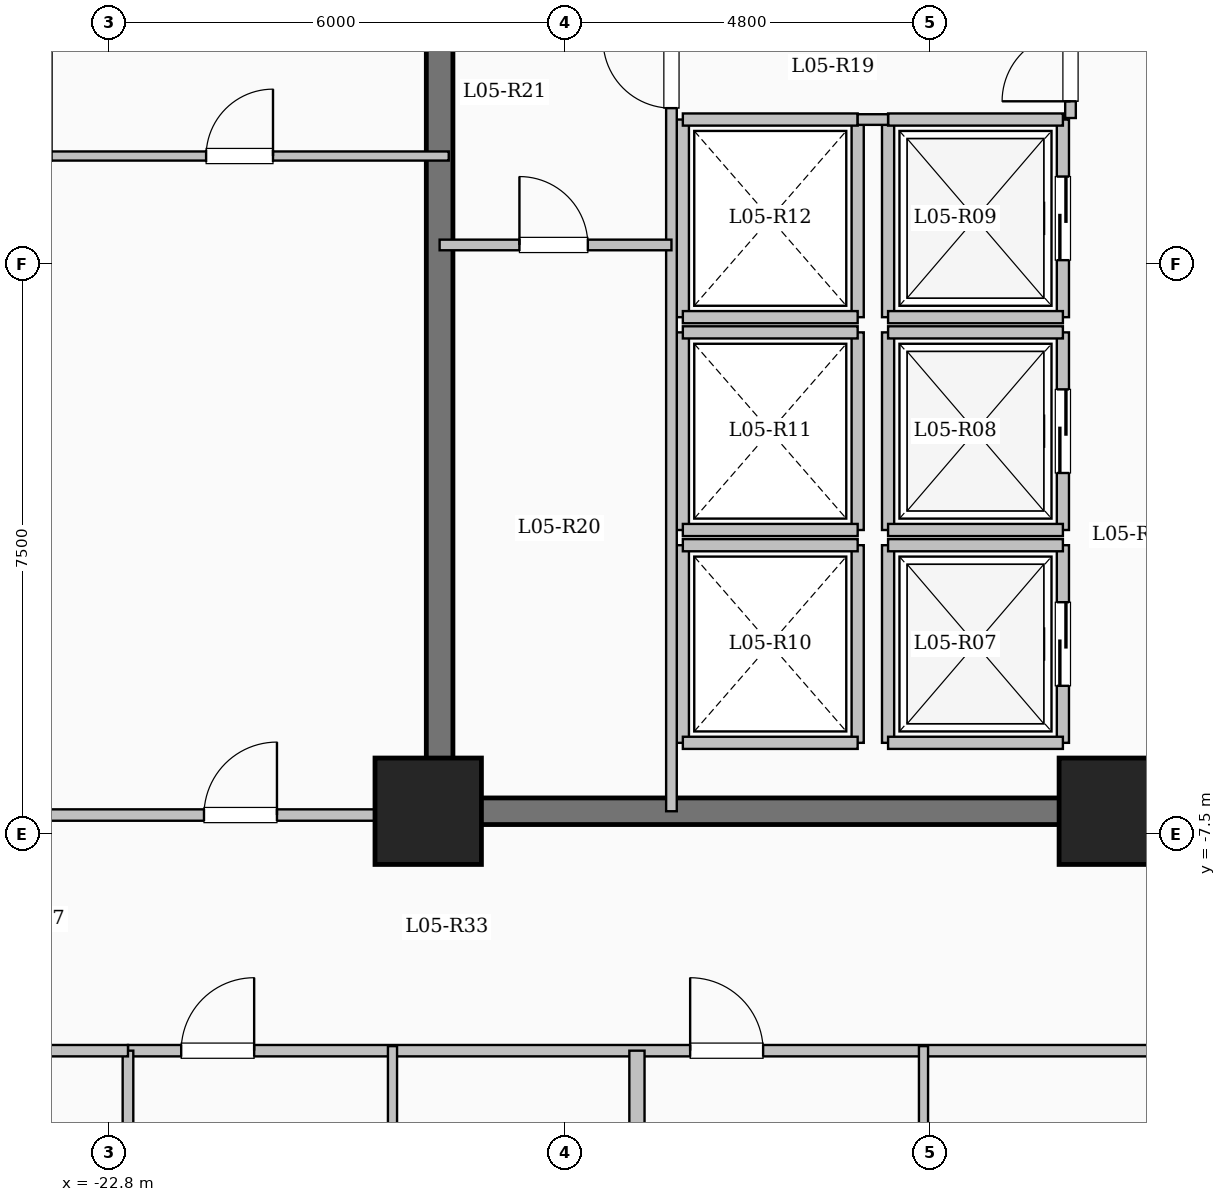
"""IFC4 building model, lengths in metres.
Left out: names, types, materials, properties, quantities, classifications, styles, units other than length and angle.
Written with IfcOpenShell. Run it as: python <this file> out.ifc"""

import sys

from ifc_helpers import new_model, si_unit, direction, frame, frame_2d, origin, origin_2d, place, context, subcontext, project, spatial, rectangle, extrude, element, fill, save


model = new_model("IFC4")
c1 = context("Model", 3, precision=1e-05, world=origin(), true_north=direction((0.0, 1.0)))
c2 = subcontext(c1, "Body", "Model", "MODEL_VIEW")
j1 = project(units=[si_unit("LENGTHUNIT", "METRE"), si_unit("PLANEANGLEUNIT", "RADIAN")], contexts=[c1])
p1 = place(None, origin())
s1 = spatial("IfcSite", under=j1, at=p1, CompositionType="ELEMENT")
p2 = place(p1, origin())
s2 = spatial("IfcBuilding", under=s1, at=p2, CompositionType="ELEMENT")
p3 = place(p2, frame((0.0, 0.0, 24.0)))
s3 = spatial("IfcBuildingStorey", under=s2, at=p3, CompositionType="ELEMENT", Elevation=24.0)
for number, where, z_axis, x_axis in (
    (1, (-9.6, -7.2, 0.0), (0.0, 0.0, 1.0), (1.0, 0.0, 0.0)),
    (2, (-18.6, -7.2, 0.0), (0.0, 0.0, 1.0), (1.0, 0.0, 0.0)),
):
    element("IfcColumn", number, at=place(p3, frame(where, z_axis=z_axis, x_axis=x_axis)), inside=s3, PredefinedType="COLUMN", context=c2, shape_type="SweptSolid", body=[
        extrude(rectangle(XDim=1.4, YDim=1.4, at=origin_2d()), origin(), (0.0, 0.0, 1.0), 3.35),
    ])
p4 = place(p3, frame((-12.55, -6.3, 0.0), z_axis=(0.0, 0.0, 1.0), x_axis=(0.0, 1.0, 0.0)))
e3 = element("IfcWall", 3, at=p4, inside=s3, PredefinedType="SOLIDWALL", context=c2, shape_type="SweptSolid", body=[
    extrude(rectangle(XDim=2.6, YDim=0.16, at=frame_2d((1.3, 0.0))), origin(), (0.0, 0.0, 1.0), 3.1),
])
p5 = place(p3, frame((-10.25, -6.3, 0.0), z_axis=(0.0, 0.0, 1.0), x_axis=(0.0, 1.0, 0.0)))
e4 = element("IfcWall", 4, at=p5, inside=s3, PredefinedType="SOLIDWALL", context=c2, shape_type="SweptSolid", body=[
    extrude(rectangle(XDim=2.6, YDim=0.16, at=frame_2d((1.3, 0.0))), origin(), (0.0, 0.0, 1.0), 3.1),
])
p6 = place(p5, frame((0.75, 0.0, 0.0)))
e5 = element("IfcOpeningElement", 5, at=p6, cuts=e4, PredefinedType="OPENING", context=c2, shape_type="SweptSolid", body=[
    extrude(rectangle(XDim=1.1, YDim=2.15, at=frame_2d((0.55, 1.075))), frame((0.0, 0.09, 0.0), z_axis=(0.0, -1.0, 0.0), x_axis=(1.0, 0.0, 0.0)), (0.0, 0.0, 1.0), 0.18),
])
for number, where, z_axis, x_axis in (
    (6, (-12.55, -6.3, 0.0), (0.0, 0.0, 1.0), (1.0, 0.0, 0.0)),
    (7, (-12.55, -3.7, 0.0), (0.0, 0.0, 1.0), (1.0, 0.0, 0.0)),
):
    element("IfcWall", number, at=place(p3, frame(where, z_axis=z_axis, x_axis=x_axis)), inside=s3, PredefinedType="SOLIDWALL", context=c2, shape_type="SweptSolid", body=[
        extrude(rectangle(XDim=2.3, YDim=0.16, at=frame_2d((1.15, 0.0))), origin(), (0.0, 0.0, 1.0), 3.1),
    ])
p7 = place(p3, frame((-12.55, -3.5, 0.0), z_axis=(0.0, 0.0, 1.0), x_axis=(0.0, 1.0, 0.0)))
e8 = element("IfcWall", 8, at=p7, inside=s3, PredefinedType="SOLIDWALL", context=c2, shape_type="SweptSolid", body=[
    extrude(rectangle(XDim=2.6, YDim=0.16, at=frame_2d((1.3, 0.0))), origin(), (0.0, 0.0, 1.0), 3.1),
])
p8 = place(p3, frame((-10.25, -3.5, 0.0), z_axis=(0.0, 0.0, 1.0), x_axis=(0.0, 1.0, 0.0)))
e9 = element("IfcWall", 9, at=p8, inside=s3, PredefinedType="SOLIDWALL", context=c2, shape_type="SweptSolid", body=[
    extrude(rectangle(XDim=2.6, YDim=0.16, at=frame_2d((1.3, 0.0))), origin(), (0.0, 0.0, 1.0), 3.1),
])
p9 = place(p8, frame((0.75, 0.0, 0.0)))
e10 = element("IfcOpeningElement", 10, at=p9, cuts=e9, PredefinedType="OPENING", context=c2, shape_type="SweptSolid", body=[
    extrude(rectangle(XDim=1.1, YDim=2.15, at=frame_2d((0.55, 1.075))), frame((0.0, 0.09, 0.0), z_axis=(0.0, -1.0, 0.0), x_axis=(1.0, 0.0, 0.0)), (0.0, 0.0, 1.0), 0.18),
])
for number, where, z_axis, x_axis in (
    (11, (-12.55, -3.5, 0.0), (0.0, 0.0, 1.0), (1.0, 0.0, 0.0)),
    (12, (-12.55, -0.9, 0.0), (0.0, 0.0, 1.0), (1.0, 0.0, 0.0)),
):
    element("IfcWall", number, at=place(p3, frame(where, z_axis=z_axis, x_axis=x_axis)), inside=s3, PredefinedType="SOLIDWALL", context=c2, shape_type="SweptSolid", body=[
        extrude(rectangle(XDim=2.3, YDim=0.16, at=frame_2d((1.15, 0.0))), origin(), (0.0, 0.0, 1.0), 3.1),
    ])
p10 = place(p3, frame((-12.55, -0.7, 0.0), z_axis=(0.0, 0.0, 1.0), x_axis=(0.0, 1.0, 0.0)))
e13 = element("IfcWall", 13, at=p10, inside=s3, PredefinedType="SOLIDWALL", context=c2, shape_type="SweptSolid", body=[
    extrude(rectangle(XDim=2.6, YDim=0.16, at=frame_2d((1.3, 0.0))), origin(), (0.0, 0.0, 1.0), 3.1),
])
p11 = place(p3, frame((-10.25, -0.7, 0.0), z_axis=(0.0, 0.0, 1.0), x_axis=(0.0, 1.0, 0.0)))
e14 = element("IfcWall", 14, at=p11, inside=s3, PredefinedType="SOLIDWALL", context=c2, shape_type="SweptSolid", body=[
    extrude(rectangle(XDim=2.6, YDim=0.16, at=frame_2d((1.3, 0.0))), origin(), (0.0, 0.0, 1.0), 3.1),
])
p12 = place(p11, frame((0.75, 0.0, 0.0)))
e15 = element("IfcOpeningElement", 15, at=p12, cuts=e14, PredefinedType="OPENING", context=c2, shape_type="SweptSolid", body=[
    extrude(rectangle(XDim=1.1, YDim=2.15, at=frame_2d((0.55, 1.075))), frame((0.0, 0.09, 0.0), z_axis=(0.0, -1.0, 0.0), x_axis=(1.0, 0.0, 0.0)), (0.0, 0.0, 1.0), 0.18),
])
for number, where, z_axis, x_axis in (
    (16, (-12.55, -0.7, 0.0), (0.0, 0.0, 1.0), (1.0, 0.0, 0.0)),
    (17, (-12.55, 1.9, 0.0), (0.0, 0.0, 1.0), (1.0, 0.0, 0.0)),
):
    element("IfcWall", number, at=place(p3, frame(where, z_axis=z_axis, x_axis=x_axis)), inside=s3, PredefinedType="SOLIDWALL", context=c2, shape_type="SweptSolid", body=[
        extrude(rectangle(XDim=2.3, YDim=0.16, at=frame_2d((1.15, 0.0))), origin(), (0.0, 0.0, 1.0), 3.1),
    ])
for number, where, z_axis, x_axis in (
    (18, (-15.25, -6.3, 0.0), (0.0, 0.0, 1.0), (0.0, 1.0, 0.0)),
    (19, (-12.95, -6.3, 0.0), (0.0, 0.0, 1.0), (0.0, 1.0, 0.0)),
):
    element("IfcWall", number, at=place(p3, frame(where, z_axis=z_axis, x_axis=x_axis)), inside=s3, PredefinedType="SOLIDWALL", context=c2, shape_type="SweptSolid", body=[
        extrude(rectangle(XDim=2.6, YDim=0.16, at=frame_2d((1.3, 0.0))), origin(), (0.0, 0.0, 1.0), 3.1),
    ])
for number, where, z_axis, x_axis in (
    (20, (-15.25, -6.3, 0.0), (0.0, 0.0, 1.0), (1.0, 0.0, 0.0)),
    (21, (-15.25, -3.7, 0.0), (0.0, 0.0, 1.0), (1.0, 0.0, 0.0)),
):
    element("IfcWall", number, at=place(p3, frame(where, z_axis=z_axis, x_axis=x_axis)), inside=s3, PredefinedType="SOLIDWALL", context=c2, shape_type="SweptSolid", body=[
        extrude(rectangle(XDim=2.3, YDim=0.16, at=frame_2d((1.15, 0.0))), origin(), (0.0, 0.0, 1.0), 3.1),
    ])
for number, where, z_axis, x_axis in (
    (22, (-15.25, -3.5, 0.0), (0.0, 0.0, 1.0), (0.0, 1.0, 0.0)),
    (23, (-12.95, -3.5, 0.0), (0.0, 0.0, 1.0), (0.0, 1.0, 0.0)),
):
    element("IfcWall", number, at=place(p3, frame(where, z_axis=z_axis, x_axis=x_axis)), inside=s3, PredefinedType="SOLIDWALL", context=c2, shape_type="SweptSolid", body=[
        extrude(rectangle(XDim=2.6, YDim=0.16, at=frame_2d((1.3, 0.0))), origin(), (0.0, 0.0, 1.0), 3.1),
    ])
for number, where, z_axis, x_axis in (
    (24, (-15.25, -3.5, 0.0), (0.0, 0.0, 1.0), (1.0, 0.0, 0.0)),
    (25, (-15.25, -0.9, 0.0), (0.0, 0.0, 1.0), (1.0, 0.0, 0.0)),
):
    element("IfcWall", number, at=place(p3, frame(where, z_axis=z_axis, x_axis=x_axis)), inside=s3, PredefinedType="SOLIDWALL", context=c2, shape_type="SweptSolid", body=[
        extrude(rectangle(XDim=2.3, YDim=0.16, at=frame_2d((1.15, 0.0))), origin(), (0.0, 0.0, 1.0), 3.1),
    ])
for number, where, z_axis, x_axis in (
    (26, (-15.25, -0.7, 0.0), (0.0, 0.0, 1.0), (0.0, 1.0, 0.0)),
    (27, (-12.95, -0.7, 0.0), (0.0, 0.0, 1.0), (0.0, 1.0, 0.0)),
):
    element("IfcWall", number, at=place(p3, frame(where, z_axis=z_axis, x_axis=x_axis)), inside=s3, PredefinedType="SOLIDWALL", context=c2, shape_type="SweptSolid", body=[
        extrude(rectangle(XDim=2.6, YDim=0.16, at=frame_2d((1.3, 0.0))), origin(), (0.0, 0.0, 1.0), 3.1),
    ])
for number, where, z_axis, x_axis in (
    (28, (-15.25, -0.7, 0.0), (0.0, 0.0, 1.0), (1.0, 0.0, 0.0)),
    (29, (-15.25, 1.9, 0.0), (0.0, 0.0, 1.0), (1.0, 0.0, 0.0)),
):
    element("IfcWall", number, at=place(p3, frame(where, z_axis=z_axis, x_axis=x_axis)), inside=s3, PredefinedType="SOLIDWALL", context=c2, shape_type="SweptSolid", body=[
        extrude(rectangle(XDim=2.3, YDim=0.16, at=frame_2d((1.15, 0.0))), origin(), (0.0, 0.0, 1.0), 3.1),
    ])
p13 = place(p3, frame((-18.45, -7.375, 0.0), z_axis=(0.0, 0.0, 1.0), x_axis=(0.0, 1.0, 0.0)))
e30 = element("IfcWall", 30, at=p13, inside=s3, PredefinedType="SHEAR", context=c2, shape_type="SweptSolid", body=[
    extrude(rectangle(XDim=14.05, YDim=0.35, at=frame_2d((7.025, 0.0))), origin(), (0.0, 0.0, 1.0), 3.35),
])
p14 = place(p3, frame((-18.625, -7.2, 0.0), z_axis=(0.0, 0.0, 1.0), x_axis=(1.0, 0.0, 0.0)))
e31 = element("IfcWall", 31, at=p14, inside=s3, PredefinedType="SHEAR", context=c2, shape_type="SweptSolid", body=[
    extrude(rectangle(XDim=8.55, YDim=0.35, at=frame_2d((4.275, 0.0))), origin(), (0.0, 0.0, 1.0), 3.35),
])
p15 = place(p3, frame((-12.95, 1.9, 0.0), z_axis=(0.0, 0.0, 1.0), x_axis=(1.0, 0.0, 0.0)))
e32 = element("IfcWall", 32, at=p15, inside=s3, PredefinedType="PARTITIONING", context=c2, shape_type="SweptSolid", body=[
    extrude(rectangle(XDim=0.4, YDim=0.14, at=frame_2d((0.2, 0.0))), origin(), (0.0, 0.0, 1.0), 3.1),
])
p16 = place(p3, frame((-10.15, 1.92, 0.0), z_axis=(0.0, 0.0, 1.0), x_axis=(0.0, 1.0, 0.0)))
e33 = element("IfcWall", 33, at=p16, inside=s3, PredefinedType="PARTITIONING", context=c2, shape_type="SweptSolid", body=[
    extrude(rectangle(XDim=1.33, YDim=0.14, at=frame_2d((0.665, 0.0))), origin(), (0.0, 0.0, 1.0), 3.1),
])
p17 = place(p16, frame((0.22, 0.0, 0.0)))
e34 = element("IfcOpeningElement", 34, at=p17, cuts=e33, PredefinedType="OPENING", context=c2, shape_type="SweptSolid", body=[
    extrude(rectangle(XDim=0.9, YDim=2.08, at=frame_2d((0.45, 1.04))), frame((0.0, 0.08, 0.0), z_axis=(0.0, -1.0, 0.0), x_axis=(1.0, 0.0, 0.0)), (0.0, 0.0, 1.0), 0.16),
])
p18 = place(p3, frame((-15.4, -7.2, 0.0), z_axis=(0.0, 0.0, 1.0), x_axis=(0.0, 1.0, 0.0)))
e35 = element("IfcWall", 35, at=p18, inside=s3, PredefinedType="PARTITIONING", context=c2, shape_type="SweptSolid", body=[
    extrude(rectangle(XDim=10.45, YDim=0.14, at=frame_2d((5.225, 0.0))), origin(), (0.0, 0.0, 1.0), 3.1),
])
p19 = place(p18, frame((9.25, 0.0, 0.0)))
e36 = element("IfcOpeningElement", 36, at=p19, cuts=e35, PredefinedType="OPENING", context=c2, shape_type="SweptSolid", body=[
    extrude(rectangle(XDim=0.9, YDim=2.08, at=frame_2d((0.45, 1.04))), frame((0.0, 0.08, 0.0), z_axis=(0.0, -1.0, 0.0), x_axis=(1.0, 0.0, 0.0)), (0.0, 0.0, 1.0), 0.16),
])
p20 = place(p3, frame((-18.45, 0.25, 0.0), z_axis=(0.0, 0.0, 1.0), x_axis=(1.0, 0.0, 0.0)))
e37 = element("IfcWall", 37, at=p20, inside=s3, PredefinedType="PARTITIONING", context=c2, shape_type="SweptSolid", body=[
    extrude(rectangle(XDim=3.05, YDim=0.14, at=frame_2d((1.525, 0.0))), origin(), (0.0, 0.0, 1.0), 3.1),
])
p21 = place(p20, frame((1.05, 0.0, 0.0)))
e38 = element("IfcOpeningElement", 38, at=p21, cuts=e37, PredefinedType="OPENING", context=c2, shape_type="SweptSolid", body=[
    extrude(rectangle(XDim=0.9, YDim=2.08, at=frame_2d((0.45, 1.04))), frame((0.0, 0.08, 0.0), z_axis=(0.0, -1.0, 0.0), x_axis=(1.0, 0.0, 0.0)), (0.0, 0.0, 1.0), 0.16),
])
p22 = place(p3, frame((-22.55, -10.35, 0.0), z_axis=(0.0, 0.0, 1.0), x_axis=(1.0, 0.0, 0.0)))
e39 = element("IfcWall", 39, at=p22, inside=s3, PredefinedType="PARTITIONING", context=c2, shape_type="SweptSolid", body=[
    extrude(rectangle(XDim=14.0, YDim=0.15, at=frame_2d((7.0, 0.0))), origin(), (0.0, 0.0, 1.0), 3.1),
])
p23 = place(p22, frame((0.7, 0.0, 0.0)))
e40 = element("IfcOpeningElement", 40, at=p23, cuts=e39, PredefinedType="OPENING", context=c2, shape_type="SweptSolid", body=[
    extrude(rectangle(XDim=0.96, YDim=2.15, at=frame_2d((0.48, 1.075))), frame((0.0, 0.085, 0.0), z_axis=(0.0, -1.0, 0.0), x_axis=(1.0, 0.0, 0.0)), (0.0, 0.0, 1.0), 0.17),
])
p24 = place(p22, frame((7.396, 0.0, 0.0)))
e41 = element("IfcOpeningElement", 41, at=p24, cuts=e39, PredefinedType="OPENING", context=c2, shape_type="SweptSolid", body=[
    extrude(rectangle(XDim=0.96, YDim=2.15, at=frame_2d((0.48, 1.075))), frame((0.0, 0.085, 0.0), z_axis=(0.0, -1.0, 0.0), x_axis=(1.0, 0.0, 0.0)), (0.0, 0.0, 1.0), 0.17),
])
p25 = place(p3, frame((-15.854, -23.6, 0.0), z_axis=(0.0, 0.0, 1.0), x_axis=(0.0, 1.0, 0.0)))
e42 = element("IfcWall", 42, at=p25, inside=s3, PredefinedType="SOLIDWALL", context=c2, shape_type="SweptSolid", body=[
    extrude(rectangle(XDim=13.25, YDim=0.2, at=frame_2d((6.625, 0.0))), origin(), (0.0, 0.0, 1.0), 3.1),
])
p26 = place(p3, frame((-19.07, -13.51, 0.0), z_axis=(0.0, 0.0, 1.0), x_axis=(0.0, 1.0, 0.0)))
e43 = element("IfcWall", 43, at=p26, inside=s3, PredefinedType="PARTITIONING", context=c2, shape_type="SweptSolid", body=[
    extrude(rectangle(XDim=3.22, YDim=0.12, at=frame_2d((1.61, 0.0))), origin(), (0.0, 0.0, 1.0), 3.1),
])
p27 = place(p26, frame((1.14, 0.0, 0.0)))
e44 = element("IfcOpeningElement", 44, at=p27, cuts=e43, PredefinedType="OPENING", context=c2, shape_type="SweptSolid", body=[
    extrude(rectangle(XDim=0.88, YDim=2.1, at=frame_2d((0.44, 1.05))), frame((0.0, 0.07, 0.0), z_axis=(0.0, -1.0, 0.0), x_axis=(1.0, 0.0, 0.0)), (0.0, 0.0, 1.0), 0.14),
])
p28 = place(p3, frame((-12.084, -13.51, 0.0), z_axis=(0.0, 0.0, 1.0), x_axis=(0.0, 1.0, 0.0)))
e45 = element("IfcWall", 45, at=p28, inside=s3, PredefinedType="PARTITIONING", context=c2, shape_type="SweptSolid", body=[
    extrude(rectangle(XDim=3.22, YDim=0.12, at=frame_2d((1.61, 0.0))), origin(), (0.0, 0.0, 1.0), 3.1),
])
p29 = place(p28, frame((1.14, 0.0, 0.0)))
e46 = element("IfcOpeningElement", 46, at=p29, cuts=e45, PredefinedType="OPENING", context=c2, shape_type="SweptSolid", body=[
    extrude(rectangle(XDim=0.88, YDim=2.1, at=frame_2d((0.44, 1.05))), frame((0.0, 0.07, 0.0), z_axis=(0.0, -1.0, 0.0), x_axis=(1.0, 0.0, 0.0)), (0.0, 0.0, 1.0), 0.14),
])
p30 = place(p3, frame((-28.68, -7.25, 0.0), z_axis=(0.0, 0.0, 1.0), x_axis=(1.0, 0.0, 0.0)))
e47 = element("IfcWall", 47, at=p30, inside=s3, PredefinedType="PARTITIONING", context=c2, shape_type="SweptSolid", body=[
    extrude(rectangle(XDim=10.23, YDim=0.15, at=frame_2d((5.115, 0.0))), origin(), (0.0, 0.0, 1.0), 3.1),
])
p31 = place(p30, frame((7.13, 0.0, 0.0)))
e48 = element("IfcOpeningElement", 48, at=p31, cuts=e47, PredefinedType="OPENING", context=c2, shape_type="SweptSolid", body=[
    extrude(rectangle(XDim=0.96, YDim=2.15, at=frame_2d((0.48, 1.075))), frame((0.0, 0.085, 0.0), z_axis=(0.0, -1.0, 0.0), x_axis=(1.0, 0.0, 0.0)), (0.0, 0.0, 1.0), 0.17),
])
p32 = place(p3, frame((-22.55, -19.05, 0.0), z_axis=(0.0, 0.0, 1.0), x_axis=(0.0, 1.0, 0.0)))
e49 = element("IfcWall", 49, at=p32, inside=s3, PredefinedType="PARTITIONING", context=c2, shape_type="SweptSolid", body=[
    extrude(rectangle(XDim=8.7, YDim=0.14, at=frame_2d((4.35, 0.0))), origin(), (0.0, 0.0, 1.0), 3.1),
])
p33 = place(p3, frame((-28.68, -10.35, 0.0), z_axis=(0.0, 0.0, 1.0), x_axis=(1.0, 0.0, 0.0)))
e50 = element("IfcWall", 50, at=p33, inside=s3, PredefinedType="PARTITIONING", context=c2, shape_type="SweptSolid", body=[
    extrude(rectangle(XDim=6.13, YDim=0.15, at=frame_2d((3.065, 0.0))), origin(), (0.0, 0.0, 1.0), 3.1),
])
p34 = place(p33, frame((2.59, 0.0, 0.0)))
e51 = element("IfcOpeningElement", 51, at=p34, cuts=e50, PredefinedType="OPENING", context=c2, shape_type="SweptSolid", body=[
    extrude(rectangle(XDim=0.95, YDim=2.15, at=frame_2d((0.475, 1.075))), frame((0.0, 0.085, 0.0), z_axis=(0.0, -1.0, 0.0), x_axis=(1.0, 0.0, 0.0)), (0.0, 0.0, 1.0), 0.17),
])
p35 = place(p3, frame((-28.8, 1.42, 0.0), z_axis=(0.0, 0.0, 1.0), x_axis=(1.0, 0.0, 0.0)))
e52 = element("IfcWall", 52, at=p35, inside=s3, PredefinedType="PARTITIONING", context=c2, shape_type="SweptSolid", body=[
    extrude(rectangle(XDim=10.47, YDim=0.12, at=frame_2d((5.235, 0.0))), origin(), (0.0, 0.0, 1.0), 3.1),
])
p36 = place(p35, frame((2.213, 0.0, 0.0)))
e53 = element("IfcOpeningElement", 53, at=p36, cuts=e52, PredefinedType="OPENING", context=c2, shape_type="SweptSolid", body=[
    extrude(rectangle(XDim=0.88, YDim=2.1, at=frame_2d((0.44, 1.05))), frame((0.0, 0.07, 0.0), z_axis=(0.0, -1.0, 0.0), x_axis=(1.0, 0.0, 0.0)), (0.0, 0.0, 1.0), 0.14),
])
p37 = place(p35, frame((7.278, 0.0, 0.0)))
e54 = element("IfcOpeningElement", 54, at=p37, cuts=e52, PredefinedType="OPENING", context=c2, shape_type="SweptSolid", body=[
    extrude(rectangle(XDim=0.88, YDim=2.1, at=frame_2d((0.44, 1.05))), frame((0.0, 0.07, 0.0), z_axis=(0.0, -1.0, 0.0), x_axis=(1.0, 0.0, 0.0)), (0.0, 0.0, 1.0), 0.14),
])
p38 = place(p6, origin())
e55 = element("IfcDoor", 55, at=p38, inside=s3, OperationType="SLIDING_TO_LEFT", PredefinedType="DOOR", context=c2, shape_type="SweptSolid", body=[
    extrude(rectangle(XDim=1.1, YDim=2.15, at=frame_2d((0.55, 1.075))), frame((0.0, 0.025, 0.0), z_axis=(0.0, -1.0, 0.0), x_axis=(1.0, 0.0, 0.0)), (0.0, 0.0, 1.0), 0.05),
])
fill(e5, e55)
p39 = place(p9, origin())
e56 = element("IfcDoor", 56, at=p39, inside=s3, OperationType="SLIDING_TO_LEFT", PredefinedType="DOOR", context=c2, shape_type="SweptSolid", body=[
    extrude(rectangle(XDim=1.1, YDim=2.15, at=frame_2d((0.55, 1.075))), frame((0.0, 0.025, 0.0), z_axis=(0.0, -1.0, 0.0), x_axis=(1.0, 0.0, 0.0)), (0.0, 0.0, 1.0), 0.05),
])
fill(e10, e56)
p40 = place(p12, origin())
e57 = element("IfcDoor", 57, at=p40, inside=s3, OperationType="SLIDING_TO_LEFT", PredefinedType="DOOR", context=c2, shape_type="SweptSolid", body=[
    extrude(rectangle(XDim=1.1, YDim=2.15, at=frame_2d((0.55, 1.075))), frame((0.0, 0.025, 0.0), z_axis=(0.0, -1.0, 0.0), x_axis=(1.0, 0.0, 0.0)), (0.0, 0.0, 1.0), 0.05),
])
fill(e15, e57)
p41 = place(p17, origin())
e58 = element("IfcDoor", 58, at=p41, inside=s3, OperationType="SINGLE_SWING_LEFT", PredefinedType="DOOR", context=c2, shape_type="SweptSolid", body=[
    extrude(rectangle(XDim=0.9, YDim=2.08, at=frame_2d((0.45, 1.04))), frame((0.0, 0.025, 0.0), z_axis=(0.0, -1.0, 0.0), x_axis=(1.0, 0.0, 0.0)), (0.0, 0.0, 1.0), 0.05),
])
fill(e34, e58)
p42 = place(p19, origin())
e59 = element("IfcDoor", 59, at=p42, inside=s3, OperationType="SINGLE_SWING_RIGHT", PredefinedType="DOOR", context=c2, shape_type="SweptSolid", body=[
    extrude(rectangle(XDim=0.9, YDim=2.08, at=frame_2d((0.45, 1.04))), frame((0.0, 0.025, 0.0), z_axis=(0.0, -1.0, 0.0), x_axis=(1.0, 0.0, 0.0)), (0.0, 0.0, 1.0), 0.05),
])
fill(e36, e59)
p43 = place(p21, origin())
e60 = element("IfcDoor", 60, at=p43, inside=s3, OperationType="SINGLE_SWING_LEFT", PredefinedType="DOOR", context=c2, shape_type="SweptSolid", body=[
    extrude(rectangle(XDim=0.9, YDim=2.08, at=frame_2d((0.45, 1.04))), frame((0.0, 0.025, 0.0), z_axis=(0.0, -1.0, 0.0), x_axis=(1.0, 0.0, 0.0)), (0.0, 0.0, 1.0), 0.05),
])
fill(e38, e60)
p44 = place(p23, origin())
e61 = element("IfcDoor", 61, at=p44, inside=s3, OperationType="SINGLE_SWING_RIGHT", PredefinedType="DOOR", context=c2, shape_type="SweptSolid", body=[
    extrude(rectangle(XDim=0.96, YDim=2.15, at=frame_2d((0.48, 1.075))), frame((0.0, 0.025, 0.0), z_axis=(0.0, -1.0, 0.0), x_axis=(1.0, 0.0, 0.0)), (0.0, 0.0, 1.0), 0.05),
])
fill(e40, e61)
p45 = place(p24, origin())
e62 = element("IfcDoor", 62, at=p45, inside=s3, OperationType="SINGLE_SWING_LEFT", PredefinedType="DOOR", context=c2, shape_type="SweptSolid", body=[
    extrude(rectangle(XDim=0.96, YDim=2.15, at=frame_2d((0.48, 1.075))), frame((0.0, 0.025, 0.0), z_axis=(0.0, -1.0, 0.0), x_axis=(1.0, 0.0, 0.0)), (0.0, 0.0, 1.0), 0.05),
])
fill(e41, e62)
p46 = place(p31, origin())
e63 = element("IfcDoor", 63, at=p46, inside=s3, OperationType="SINGLE_SWING_RIGHT", PredefinedType="DOOR", context=c2, shape_type="SweptSolid", body=[
    extrude(rectangle(XDim=0.96, YDim=2.15, at=frame_2d((0.48, 1.075))), frame((0.0, 0.025, 0.0), z_axis=(0.0, -1.0, 0.0), x_axis=(1.0, 0.0, 0.0)), (0.0, 0.0, 1.0), 0.05),
])
fill(e48, e63)
p47 = place(p37, origin())
e64 = element("IfcDoor", 64, at=p47, inside=s3, OperationType="SINGLE_SWING_RIGHT", PredefinedType="DOOR", context=c2, shape_type="SweptSolid", body=[
    extrude(rectangle(XDim=0.88, YDim=2.1, at=frame_2d((0.44, 1.05))), frame((0.0, 0.025, 0.0), z_axis=(0.0, -1.0, 0.0), x_axis=(1.0, 0.0, 0.0)), (0.0, 0.0, 1.0), 0.05),
])
fill(e54, e64)
save(model, sys.argv[1])
